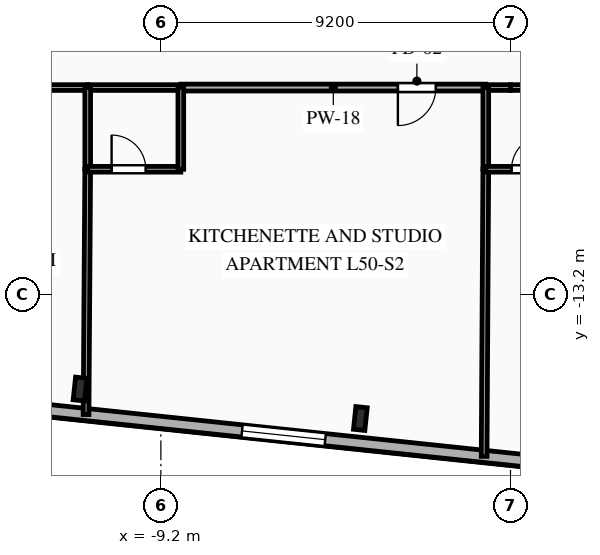
"""IFC4 building model, lengths in metres.
Left out: names, types, materials, properties, quantities, classifications, styles, units other than length and angle.
Written with IfcOpenShell. Run it as: python <this file> out.ifc"""

import sys

from ifc_helpers import new_model, si_unit, direction, frame, frame_2d, origin, origin_2d, place, context, subcontext, project, spatial, rectangle, i_section, extrude, element, fill, save


model = new_model("IFC4")
c1 = context("Model", 3, precision=1e-05, world=origin(), true_north=direction((0.0, 1.0)))
c2 = subcontext(c1, "Body", "Model", "MODEL_VIEW")
j1 = project(units=[si_unit("LENGTHUNIT", "METRE"), si_unit("PLANEANGLEUNIT", "RADIAN")], contexts=[c1])
p1 = place(None, origin())
s1 = spatial("IfcSite", under=j1, at=p1, CompositionType="ELEMENT")
p2 = place(p1, origin())
s2 = spatial("IfcBuilding", under=s1, at=p2, CompositionType="ELEMENT")
p3 = place(p2, frame((0.0, 0.0, 179.65)))
s3 = spatial("IfcBuildingStorey", under=s2, at=p3, CompositionType="ELEMENT", Elevation=179.65)
for number, where, z_axis, x_axis in (
    (1, (-11.327, -15.683, 0.0), (0.0, 0.0, 1.0), (0.995, -0.105, 0.0)),
    (2, (-3.951, -16.458, 0.0), (0.0, 0.0, 1.0), (0.995, -0.105, 0.0)),
):
    element("IfcColumn", number, at=place(p3, frame(where, z_axis=z_axis, x_axis=x_axis)), inside=s3, PredefinedType="COLUMN", context=c2, shape_type="SweptSolid", body=[
        extrude(i_section(OverallWidth=0.3, OverallDepth=0.6, WebThickness=0.015, FlangeThickness=0.03, FilletRadius=0.027, at=origin_2d()), origin(), (0.0, 0.0, 1.0), 3.35),
    ])
p4 = place(p3, frame((18.756, -19.498, 0.0), z_axis=(0.0, 0.0, 1.0), x_axis=(-0.994522060044, 0.104526896475, 0.0)))
e3 = element("IfcWall", 3, at=p4, inside=s3, PredefinedType="SOLIDWALL", context=c2, shape_type="SweptSolid", body=[
    extrude(rectangle(XDim=45.8, YDim=0.32, at=frame_2d((22.9, 0.0))), origin(), (0.0, 0.0, 1.0), 3.04),
])
p5 = place(p4, frame((1.137, 0.0, 0.85)))
e4 = element("IfcOpeningElement", 4, at=p5, cuts=e3, PredefinedType="OPENING", context=c2, shape_type="SweptSolid", body=[
    extrude(rectangle(XDim=1.65, YDim=1.85, at=frame_2d((0.825, 0.925))), frame((0.0, 0.17, 0.0), z_axis=(0.0, -1.0, 0.0), x_axis=(1.0, 0.0, 0.0)), (0.0, 0.0, 1.0), 0.34),
])
p6 = place(p4, frame((5.42, 0.0, 0.85)))
e5 = element("IfcOpeningElement", 5, at=p6, cuts=e3, PredefinedType="OPENING", context=c2, shape_type="SweptSolid", body=[
    extrude(rectangle(XDim=1.65, YDim=1.85, at=frame_2d((0.825, 0.925))), frame((0.0, 0.17, 0.0), z_axis=(0.0, -1.0, 0.0), x_axis=(1.0, 0.0, 0.0)), (0.0, 0.0, 1.0), 0.34),
])
p7 = place(p4, frame((13.232, 0.0, 0.85)))
e6 = element("IfcOpeningElement", 6, at=p7, cuts=e3, PredefinedType="OPENING", context=c2, shape_type="SweptSolid", body=[
    extrude(rectangle(XDim=2.2, YDim=1.85, at=frame_2d((1.1, 0.925))), frame((0.0, 0.17, 0.0), z_axis=(0.0, -1.0, 0.0), x_axis=(1.0, 0.0, 0.0)), (0.0, 0.0, 1.0), 0.34),
])
p8 = place(p4, frame((23.762, 0.0, 0.85)))
e7 = element("IfcOpeningElement", 7, at=p8, cuts=e3, PredefinedType="OPENING", context=c2, shape_type="SweptSolid", body=[
    extrude(rectangle(XDim=2.2, YDim=1.85, at=frame_2d((1.1, 0.925))), frame((0.0, 0.17, 0.0), z_axis=(0.0, -1.0, 0.0), x_axis=(1.0, 0.0, 0.0)), (0.0, 0.0, 1.0), 0.34),
])
p9 = place(p4, frame((31.763, 0.0, 0.85)))
e8 = element("IfcOpeningElement", 8, at=p9, cuts=e3, PredefinedType="OPENING", context=c2, shape_type="SweptSolid", body=[
    extrude(rectangle(XDim=1.65, YDim=1.85, at=frame_2d((0.825, 0.925))), frame((0.0, 0.17, 0.0), z_axis=(0.0, -1.0, 0.0), x_axis=(1.0, 0.0, 0.0)), (0.0, 0.0, 1.0), 0.34),
])
p10 = place(p4, frame((35.883, 0.0, 0.85)))
e9 = element("IfcOpeningElement", 9, at=p10, cuts=e3, PredefinedType="OPENING", context=c2, shape_type="SweptSolid", body=[
    extrude(rectangle(XDim=1.65, YDim=1.85, at=frame_2d((0.825, 0.925))), frame((0.0, 0.17, 0.0), z_axis=(0.0, -1.0, 0.0), x_axis=(1.0, 0.0, 0.0)), (0.0, 0.0, 1.0), 0.34),
])
p11 = place(p4, frame((41.892, 0.0, 0.85)))
e10 = element("IfcOpeningElement", 10, at=p11, cuts=e3, PredefinedType="OPENING", context=c2, shape_type="SweptSolid", body=[
    extrude(rectangle(XDim=1.65, YDim=1.85, at=frame_2d((0.825, 0.925))), frame((0.0, 0.17, 0.0), z_axis=(0.0, -1.0, 0.0), x_axis=(1.0, 0.0, 0.0)), (0.0, 0.0, 1.0), 0.34),
])
p12 = place(p3, frame((-11.125, -7.75, 0.0), z_axis=(0.0, 0.0, 1.0), x_axis=(-1.0, 0.0, 0.0)))
e11 = element("IfcWall", 11, at=p12, inside=s3, PredefinedType="PARTITIONING", context=c2, shape_type="SweptSolid", body=[
    extrude(rectangle(XDim=4.913, YDim=0.15, at=frame_2d((2.456, 0.0))), origin(), (0.0, 0.0, 1.0), 3.04),
])
p13 = place(p12, frame((2.269, 0.0, 0.0)))
e12 = element("IfcOpeningElement", 12, at=p13, cuts=e11, PredefinedType="OPENING", context=c2, shape_type="SweptSolid", body=[
    extrude(rectangle(XDim=1.05, YDim=2.15, at=frame_2d((0.525, 1.075))), frame((0.0, 0.085, 0.0), z_axis=(0.0, -1.0, 0.0), x_axis=(1.0, 0.0, 0.0)), (0.0, 0.0, 1.0), 0.17),
])
p14 = place(p3, frame((-0.65, -7.75, 0.0), z_axis=(0.0, 0.0, 1.0), x_axis=(-1.0, 0.0, 0.0)))
e13 = element("IfcWall", 13, at=p14, inside=s3, PredefinedType="PARTITIONING", context=c2, shape_type="SweptSolid", body=[
    extrude(rectangle(XDim=8.025, YDim=0.18, at=frame_2d((4.013, 0.0))), origin(), (0.0, 0.0, 1.0), 3.04),
])
p15 = place(p14, frame((1.313, 0.0, 0.0)))
e14 = element("IfcOpeningElement", 14, at=p15, cuts=e13, PredefinedType="OPENING", context=c2, shape_type="SweptSolid", body=[
    extrude(rectangle(XDim=1.0, YDim=2.15, at=frame_2d((0.5, 1.075))), frame((0.0, 0.1, 0.0), z_axis=(0.0, -1.0, 0.0), x_axis=(1.0, 0.0, 0.0)), (0.0, 0.0, 1.0), 0.2),
])
p16 = place(p3, frame((-8.675, -7.75, 0.0), z_axis=(0.0, 0.0, 1.0), x_axis=(-1.0, 0.0, 0.0)))
e15 = element("IfcWall", 15, at=p16, inside=s3, PredefinedType="PLUMBINGWALL", context=c2, shape_type="SweptSolid", body=[
    extrude(rectangle(XDim=2.45, YDim=0.15, at=frame_2d((1.225, 0.0))), origin(), (0.0, 0.0, 1.0), 3.04),
])
p17 = place(p3, frame((0.0, -7.75, 0.0), z_axis=(0.0, 0.0, 1.0), x_axis=(-1.0, 0.0, 0.0)))
e16 = element("IfcWall", 16, at=p17, inside=s3, PredefinedType="PLUMBINGWALL", context=c2, shape_type="SweptSolid", body=[
    extrude(rectangle(XDim=0.65, YDim=0.15, at=frame_2d((0.325, 0.0))), origin(), (0.0, 0.0, 1.0), 3.04),
])
p18 = place(p3, frame((1.8, -7.75, 0.0), z_axis=(0.0, 0.0, 1.0), x_axis=(-1.0, 0.0, 0.0)))
e17 = element("IfcWall", 17, at=p18, inside=s3, PredefinedType="PLUMBINGWALL", context=c2, shape_type="SweptSolid", body=[
    extrude(rectangle(XDim=1.8, YDim=0.15, at=frame_2d((0.9, 0.0))), origin(), (0.0, 0.0, 1.0), 3.04),
])
p19 = place(p3, frame((-11.125, -9.9, 0.0), z_axis=(0.0, 0.0, 1.0), x_axis=(-0.006809511849, -0.999976815005, 0.0)))
e18 = element("IfcWall", 18, at=p19, inside=s3, PredefinedType="PARTITIONING", context=c2, shape_type="SweptSolid", body=[
    extrude(rectangle(XDim=6.454, YDim=0.15, at=frame_2d((3.227, 0.0))), origin(), (0.0, 0.0, 1.0), 2.665),
])
p20 = place(p3, frame((-11.125, -7.75, 0.0), z_axis=(0.0, 0.0, 1.0), x_axis=(0.0, -1.0, 0.0)))
e19 = element("IfcWall", 19, at=p20, inside=s3, PredefinedType="PLUMBINGWALL", context=c2, shape_type="SweptSolid", body=[
    extrude(rectangle(XDim=2.15, YDim=0.15, at=frame_2d((1.075, 0.0))), origin(), (0.0, 0.0, 1.0), 3.04),
])
p21 = place(p3, frame((-11.125, -9.9, 0.0), z_axis=(0.0, 0.0, 1.0), x_axis=(1.0, 0.0, 0.0)))
e20 = element("IfcWall", 20, at=p21, inside=s3, PredefinedType="PLUMBINGWALL", context=c2, shape_type="SweptSolid", body=[
    extrude(rectangle(XDim=2.45, YDim=0.15, at=frame_2d((1.225, 0.0))), origin(), (0.0, 0.0, 1.0), 3.04),
])
p22 = place(p21, frame((0.629, 0.0, 0.0)))
e21 = element("IfcOpeningElement", 21, at=p22, cuts=e20, PredefinedType="OPENING", context=c2, shape_type="SweptSolid", body=[
    extrude(rectangle(XDim=0.9, YDim=2.1, at=frame_2d((0.45, 1.05))), frame((0.0, 0.085, 0.0), z_axis=(0.0, -1.0, 0.0), x_axis=(1.0, 0.0, 0.0)), (0.0, 0.0, 1.0), 0.17),
])
p23 = place(p3, frame((-8.675, -9.9, 0.0), z_axis=(0.0, 0.0, 1.0), x_axis=(0.0, 1.0, 0.0)))
e22 = element("IfcWall", 22, at=p23, inside=s3, PredefinedType="PLUMBINGWALL", context=c2, shape_type="SweptSolid", body=[
    extrude(rectangle(XDim=2.15, YDim=0.15, at=frame_2d((1.075, 0.0))), origin(), (0.0, 0.0, 1.0), 3.04),
])
p24 = place(p3, frame((-0.65, -9.9, 0.0), z_axis=(0.0, 0.0, 1.0), x_axis=(-0.005817237229, -0.999983079732, 0.0)))
e23 = element("IfcWall", 23, at=p24, inside=s3, PredefinedType="PARTITIONING", context=c2, shape_type="SweptSolid", body=[
    extrude(rectangle(XDim=7.554, YDim=0.15, at=frame_2d((3.777, 0.0))), origin(), (0.0, 0.0, 1.0), 3.04),
])
p25 = place(p3, frame((-0.65, -7.75, 0.0), z_axis=(0.0, 0.0, 1.0), x_axis=(0.0, -1.0, 0.0)))
e24 = element("IfcWall", 24, at=p25, inside=s3, PredefinedType="PLUMBINGWALL", context=c2, shape_type="SweptSolid", body=[
    extrude(rectangle(XDim=2.15, YDim=0.15, at=frame_2d((1.075, 0.0))), origin(), (0.0, 0.0, 1.0), 3.04),
])
p26 = place(p3, frame((-0.65, -9.9, 0.0), z_axis=(0.0, 0.0, 1.0), x_axis=(1.0, 0.0, 0.0)))
e25 = element("IfcWall", 25, at=p26, inside=s3, PredefinedType="PLUMBINGWALL", context=c2, shape_type="SweptSolid", body=[
    extrude(rectangle(XDim=2.45, YDim=0.15, at=frame_2d((1.225, 0.0))), origin(), (0.0, 0.0, 1.0), 3.04),
])
p27 = place(p26, frame((0.677, 0.0, 0.0)))
e26 = element("IfcOpeningElement", 26, at=p27, cuts=e25, PredefinedType="OPENING", context=c2, shape_type="SweptSolid", body=[
    extrude(rectangle(XDim=0.9, YDim=2.1, at=frame_2d((0.45, 1.05))), frame((0.0, 0.085, 0.0), z_axis=(0.0, -1.0, 0.0), x_axis=(1.0, 0.0, 0.0)), (0.0, 0.0, 1.0), 0.17),
])
p28 = place(p8, origin())
e27 = element("IfcWindow", 27, at=p28, inside=s3, PartitioningType="SINGLE_PANEL", PredefinedType="WINDOW", context=c2, shape_type="SweptSolid", body=[
    extrude(rectangle(XDim=2.2, YDim=1.85, at=frame_2d((1.1, 0.925))), frame((0.0, 0.03, 0.0), z_axis=(0.0, -1.0, 0.0), x_axis=(1.0, 0.0, 0.0)), (0.0, 0.0, 1.0), 0.06),
])
fill(e7, e27)
p29 = place(p15, origin())
e28 = element("IfcDoor", 28, at=p29, inside=s3, OperationType="SINGLE_SWING_RIGHT", PredefinedType="DOOR", context=c2, shape_type="SweptSolid", body=[
    extrude(rectangle(XDim=1.0, YDim=2.15, at=frame_2d((0.5, 1.075))), frame((0.0, 0.025, 0.0), z_axis=(0.0, -1.0, 0.0), x_axis=(1.0, 0.0, 0.0)), (0.0, 0.0, 1.0), 0.05),
])
fill(e14, e28)
p30 = place(p22, origin())
e29 = element("IfcDoor", 29, at=p30, inside=s3, OperationType="SINGLE_SWING_LEFT", PredefinedType="DOOR", context=c2, shape_type="SweptSolid", body=[
    extrude(rectangle(XDim=0.9, YDim=2.1, at=frame_2d((0.45, 1.05))), frame((0.0, 0.025, 0.0), z_axis=(0.0, -1.0, 0.0), x_axis=(1.0, 0.0, 0.0)), (0.0, 0.0, 1.0), 0.05),
])
fill(e21, e29)
p31 = place(p27, origin())
e30 = element("IfcDoor", 30, at=p31, inside=s3, OperationType="SINGLE_SWING_RIGHT", PredefinedType="DOOR", context=c2, shape_type="SweptSolid", body=[
    extrude(rectangle(XDim=0.9, YDim=2.1, at=frame_2d((0.45, 1.05))), frame((0.0, 0.025, 0.0), z_axis=(0.0, -1.0, 0.0), x_axis=(1.0, 0.0, 0.0)), (0.0, 0.0, 1.0), 0.05),
])
fill(e26, e30)
save(model, sys.argv[1])
